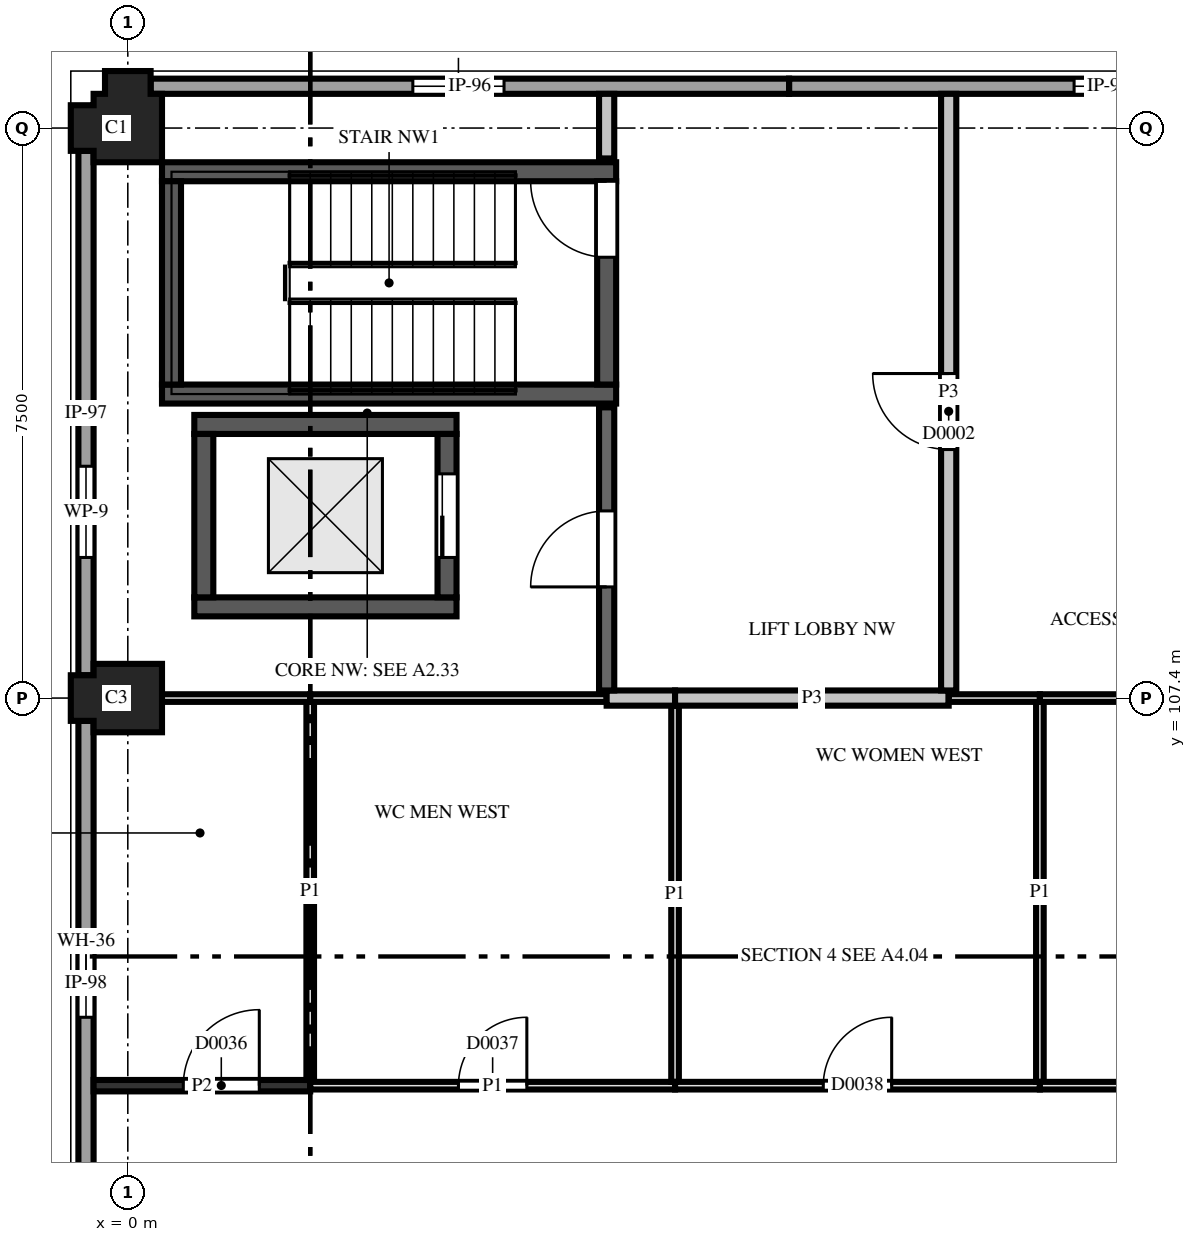
"""IFC4 building model, lengths in metres.
Left out: names, types, materials, properties, quantities, classifications, styles, units other than length and angle.
Written with IfcOpenShell. Run it as: python <this file> out.ifc"""

import sys

from ifc_helpers import new_model, si_unit, direction, frame, frame_2d, origin, place, context, subcontext, project, spatial, polyline, rectangle, outline, extrude, element, fill, save


model = new_model("IFC4")
c1 = context("Model", 3, precision=1e-05, world=origin(), true_north=direction((0.0, 1.0)))
c2 = subcontext(c1, "Body", "Model", "MODEL_VIEW")
j1 = project(units=[si_unit("LENGTHUNIT", "METRE"), si_unit("PLANEANGLEUNIT", "RADIAN")], contexts=[c1])
p1 = place(None, origin())
s1 = spatial("IfcSite", under=j1, at=p1, CompositionType="ELEMENT")
p2 = place(p1, origin())
s2 = spatial("IfcBuilding", under=s1, at=p2, CompositionType="ELEMENT")
p3 = place(p2, origin())
s3 = spatial("IfcBuildingStorey", under=s2, at=p3, CompositionType="ELEMENT", Elevation=0.0)
p4 = place(p3, frame((0.0, 107.4, 0.0), z_axis=(0.0, 0.0, 1.0), x_axis=(-1.0, 0.0, 0.0)))
e1 = element("IfcColumn", 1, at=p4, inside=s3, PredefinedType="COLUMN", context=c2, shape_type="SweptSolid", body=[
    extrude(outline(polyline([(-0.45, -0.45), (0.45, -0.45), (0.45, -0.3), (0.75, -0.3), (0.75, 0.3), (0.45, 0.3), (0.45, 0.45), (-0.45, 0.45), (-0.45, -0.45)])), origin(), (0.0, 0.0, 1.0), 4.5),
])
p5 = place(p3, frame((0.0, 114.9, 0.0), z_axis=(0.0, 0.0, 1.0), x_axis=(0.0, 1.0, 0.0)))
e2 = element("IfcColumn", 2, at=p5, inside=s3, PredefinedType="COLUMN", context=c2, shape_type="SweptSolid", body=[
    extrude(outline(polyline([(-0.45, -0.45), (0.45, -0.45), (0.45, -0.3), (0.75, -0.3), (0.75, 0.3), (0.45, 0.3), (0.45, 0.45), (0.3, 0.45), (0.3, 0.75), (-0.3, 0.75), (-0.3, 0.45), (-0.45, 0.45), (-0.45, -0.45)])), origin(), (0.0, 0.0, 1.0), 4.5),
])
for number, where, z_axis, x_axis in (
    (3, (0.875, 108.6, -1.4), (0.0, 0.0, 1.0), (1.0, 0.0, 0.0)),
    (4, (0.875, 111.0, -1.4), (0.0, 0.0, 1.0), (1.0, 0.0, 0.0)),
):
    element("IfcWall", number, at=place(p3, frame(where, z_axis=z_axis, x_axis=x_axis)), inside=s3, PredefinedType="SHEAR", context=c2, shape_type="SweptSolid", body=[
        extrude(rectangle(XDim=3.45, YDim=0.25, at=frame_2d((1.725, 0.0))), origin(), (0.0, 0.0, 1.0), 5.9),
    ])
for number, where, z_axis, x_axis in (
    (5, (0.45, 111.4, 0.0), (0.0, 0.0, 1.0), (1.0, 0.0, 0.0)),
    (6, (0.45, 114.325, 0.0), (0.0, 0.0, 1.0), (1.0, 0.0, 0.0)),
):
    element("IfcWall", number, at=place(p3, frame(where, z_axis=z_axis, x_axis=x_axis)), inside=s3, PredefinedType="SHEAR", context=c2, shape_type="SweptSolid", body=[
        extrude(rectangle(XDim=5.975, YDim=0.25, at=frame_2d((2.988, 0.0))), origin(), (0.0, 0.0, 1.0), 4.5),
    ])
p6 = place(p3, frame((0.575, 111.525, 0.0), z_axis=(0.0, 0.0, 1.0), x_axis=(0.0, 1.0, 0.0)))
e7 = element("IfcWall", 7, at=p6, inside=s3, PredefinedType="SHEAR", context=c2, shape_type="SweptSolid", body=[
    extrude(rectangle(XDim=2.675, YDim=0.25, at=frame_2d((1.337, 0.0))), origin(), (0.0, 0.0, 1.0), 4.5),
])
p7 = place(p3, frame((1.0, 108.725, -1.4), z_axis=(0.0, 0.0, 1.0), x_axis=(0.0, 1.0, 0.0)))
e8 = element("IfcWall", 8, at=p7, inside=s3, PredefinedType="SHEAR", context=c2, shape_type="SweptSolid", body=[
    extrude(rectangle(XDim=2.15, YDim=0.25, at=frame_2d((1.075, 0.0))), origin(), (0.0, 0.0, 1.0), 5.9),
])
p8 = place(p3, frame((4.2, 108.725, -1.4), z_axis=(0.0, 0.0, 1.0), x_axis=(0.0, 1.0, 0.0)))
e9 = element("IfcWall", 9, at=p8, inside=s3, PredefinedType="SHEAR", context=c2, shape_type="SweptSolid", body=[
    extrude(rectangle(XDim=2.15, YDim=0.25, at=frame_2d((1.075, 0.0))), origin(), (0.0, 0.0, 1.0), 5.9),
])
p9 = place(p8, frame((0.525, 0.0, 1.4)))
e10 = element("IfcOpeningElement", 10, at=p9, cuts=e9, PredefinedType="OPENING", context=c2, shape_type="SweptSolid", body=[
    extrude(rectangle(XDim=1.1, YDim=2.1, at=frame_2d((0.55, 1.05))), frame((0.0, 0.135, 0.0), z_axis=(0.0, -1.0, 0.0), x_axis=(1.0, 0.0, 0.0)), (0.0, 0.0, 1.0), 0.27),
])
p10 = place(p3, frame((6.3, 111.525, 0.0), z_axis=(0.0, 0.0, 1.0), x_axis=(0.0, 1.0, 0.0)))
e11 = element("IfcWall", 11, at=p10, inside=s3, PredefinedType="SHEAR", context=c2, shape_type="SweptSolid", body=[
    extrude(rectangle(XDim=2.675, YDim=0.25, at=frame_2d((1.337, 0.0))), origin(), (0.0, 0.0, 1.0), 4.5),
])
p11 = place(p10, frame((1.675, 0.0, 0.0)))
e12 = element("IfcOpeningElement", 12, at=p11, cuts=e11, PredefinedType="OPENING", context=c2, shape_type="SweptSolid", body=[
    extrude(rectangle(XDim=1.0, YDim=2.1, at=frame_2d((0.5, 1.05))), frame((0.0, 0.135, 0.0), z_axis=(0.0, -1.0, 0.0), x_axis=(1.0, 0.0, 0.0)), (0.0, 0.0, 1.0), 0.27),
])
p12 = place(p3, frame((17.1, 115.45, 0.0), z_axis=(0.0, 0.0, 1.0), x_axis=(-1.0, 0.0, 0.0)))
e13 = element("IfcWall", 13, at=p12, inside=s3, PredefinedType="SOLIDWALL", context=c2, shape_type="SweptSolid", body=[
    extrude(outline(polyline([(0.0, 0.0), (8.4, 0.0), (8.4, 2.5), (7.202, 2.5), (7.2, 2.4), (6.806, 2.412), (6.413, 2.422), (6.019, 2.43), (5.625, 2.438), (5.231, 2.443), (4.837, 2.447), (4.444, 2.449), (4.05, 2.45), (3.656, 2.449), (3.262, 2.447), (2.869, 2.443), (2.475, 2.438), (2.081, 2.43), (1.688, 2.422), (1.294, 2.412), (0.9, 2.4), (0.898, 2.5), (0.0, 2.5), (0.0, 0.0)])), frame((0.0, 0.1, 0.0), z_axis=(0.0, -1.0, 0.0), x_axis=(1.0, 0.0, 0.0)), (0.0, 0.0, 1.0), 0.2),
])
p13 = place(p12, frame((3.45, 0.0, 0.6)))
e14 = element("IfcOpeningElement", 14, at=p13, cuts=e13, PredefinedType="OPENING", context=c2, shape_type="SweptSolid", body=[
    extrude(rectangle(XDim=1.2, YDim=1.2, at=frame_2d((0.6, 0.6))), frame((0.0, 0.11, 0.0), z_axis=(0.0, -1.0, 0.0), x_axis=(1.0, 0.0, 0.0)), (0.0, 0.0, 1.0), 0.22),
])
p14 = place(p3, frame((8.7, 115.45, 0.0), z_axis=(0.0, 0.0, 1.0), x_axis=(-1.0, 0.0, 0.0)))
e15 = element("IfcWall", 15, at=p14, inside=s3, PredefinedType="SOLIDWALL", context=c2, shape_type="SweptSolid", body=[
    extrude(outline(polyline([(0.0, 0.0), (8.4, 0.0), (8.4, 2.5), (7.502, 2.5), (7.5, 2.4), (7.106, 2.412), (6.712, 2.422), (6.319, 2.43), (5.925, 2.438), (5.531, 2.443), (5.137, 2.447), (4.744, 2.449), (4.35, 2.45), (3.956, 2.449), (3.562, 2.447), (3.169, 2.443), (2.775, 2.438), (2.381, 2.43), (1.988, 2.422), (1.594, 2.412), (1.2, 2.4), (1.198, 2.5), (0.0, 2.5), (0.0, 0.0)])), frame((0.0, 0.1, 0.0), z_axis=(0.0, -1.0, 0.0), x_axis=(1.0, 0.0, 0.0)), (0.0, 0.0, 1.0), 0.2),
])
p15 = place(p14, frame((3.75, 0.0, 0.6)))
e16 = element("IfcOpeningElement", 16, at=p15, cuts=e15, PredefinedType="OPENING", context=c2, shape_type="SweptSolid", body=[
    extrude(rectangle(XDim=1.2, YDim=1.2, at=frame_2d((0.6, 0.6))), frame((0.0, 0.11, 0.0), z_axis=(0.0, -1.0, 0.0), x_axis=(1.0, 0.0, 0.0)), (0.0, 0.0, 1.0), 0.22),
])
p16 = place(p3, frame((-0.55, 114.6, 0.0), z_axis=(0.0, 0.0, 1.0), x_axis=(0.0, -1.0, 0.0)))
e17 = element("IfcWall", 17, at=p16, inside=s3, PredefinedType="SOLIDWALL", context=c2, shape_type="SweptSolid", body=[
    extrude(outline(polyline([(0.0, 0.0), (6.9, 0.0), (6.9, 3.1), (6.002, 3.1), (6.0, 2.4), (5.681, 2.56), (5.363, 2.695), (5.044, 2.806), (4.725, 2.895), (4.406, 2.963), (4.087, 3.012), (3.769, 3.041), (3.45, 3.05), (3.131, 3.041), (2.812, 3.012), (2.494, 2.963), (2.175, 2.895), (1.856, 2.806), (1.538, 2.695), (1.219, 2.56), (0.9, 2.4), (0.898, 3.1), (0.0, 3.1), (0.0, 0.0)])), frame((0.0, 0.1, 0.0), z_axis=(0.0, -1.0, 0.0), x_axis=(1.0, 0.0, 0.0)), (0.0, 0.0, 1.0), 0.2),
])
p17 = place(p16, frame((4.15, 0.0, 0.6)))
e18 = element("IfcOpeningElement", 18, at=p17, cuts=e17, PredefinedType="OPENING", context=c2, shape_type="SweptSolid", body=[
    extrude(rectangle(XDim=1.2, YDim=1.2, at=frame_2d((0.6, 0.6))), frame((0.0, 0.11, 0.0), z_axis=(0.0, -1.0, 0.0), x_axis=(1.0, 0.0, 0.0)), (0.0, 0.0, 1.0), 0.22),
])
p18 = place(p3, frame((-0.55, 107.1, 0.0), z_axis=(0.0, 0.0, 1.0), x_axis=(0.0, -1.0, 0.0)))
e19 = element("IfcWall", 19, at=p18, inside=s3, PredefinedType="SOLIDWALL", context=c2, shape_type="SweptSolid", body=[
    extrude(outline(polyline([(0.0, 0.0), (6.9, 0.0), (6.9, 3.1), (6.002, 3.1), (6.0, 2.4), (5.681, 2.56), (5.363, 2.695), (5.044, 2.806), (4.725, 2.895), (4.406, 2.963), (4.087, 3.012), (3.769, 3.041), (3.45, 3.05), (3.131, 3.041), (2.812, 3.012), (2.494, 2.963), (2.175, 2.895), (1.856, 2.806), (1.538, 2.695), (1.219, 2.56), (0.9, 2.4), (0.898, 3.1), (0.0, 3.1), (0.0, 0.0)])), frame((0.0, 0.1, 0.0), z_axis=(0.0, -1.0, 0.0), x_axis=(1.0, 0.0, 0.0)), (0.0, 0.0, 1.0), 0.2),
])
p19 = place(p18, frame((3.0, 0.0, 2.4)))
e20 = element("IfcOpeningElement", 20, at=p19, cuts=e19, PredefinedType="OPENING", context=c2, shape_type="SweptSolid", body=[
    extrude(rectangle(XDim=0.9, YDim=0.531, at=frame_2d((0.45, 0.266))), frame((0.0, 0.11, 0.0), z_axis=(0.0, -1.0, 0.0), x_axis=(1.0, 0.0, 0.0)), (0.0, 0.0, 1.0), 0.22),
])
p20 = place(p3, frame((2.4, 102.3, 0.0), z_axis=(0.0, 0.0, 1.0), x_axis=(-1.0, 0.0, 0.0)))
e21 = element("IfcWall", 21, at=p20, inside=s3, PredefinedType="PARTITIONING", context=c2, shape_type="SweptSolid", body=[
    extrude(rectangle(XDim=2.85, YDim=0.15, at=frame_2d((1.425, 0.0))), origin(), (0.0, 0.0, 1.0), 3.68),
])
p21 = place(p20, frame((0.67, 0.0, 0.0)))
e22 = element("IfcOpeningElement", 22, at=p21, cuts=e21, PredefinedType="OPENING", context=c2, shape_type="SweptSolid", body=[
    extrude(rectangle(XDim=1.0, YDim=2.1, at=frame_2d((0.5, 1.05))), frame((0.0, 0.085, 0.0), z_axis=(0.0, -1.0, 0.0), x_axis=(1.0, 0.0, 0.0)), (0.0, 0.0, 1.0), 0.17),
])
p22 = place(p3, frame((2.4, 102.375, 0.0), z_axis=(0.0, 0.0, 1.0), x_axis=(0.0, 1.0, 0.0)))
e23 = element("IfcWall", 23, at=p22, inside=s3, PredefinedType="PARTITIONING", context=c2, shape_type="SweptSolid", body=[
    extrude(rectangle(XDim=4.975, YDim=0.1, at=frame_2d((2.488, 0.0))), origin(), (0.0, 0.0, 1.0), 3.68),
])
p23 = place(p3, frame((7.2, 102.3, 0.0), z_axis=(0.0, 0.0, 1.0), x_axis=(-1.0, 0.0, 0.0)))
e24 = element("IfcWall", 24, at=p23, inside=s3, PredefinedType="PARTITIONING", context=c2, shape_type="SweptSolid", body=[
    extrude(rectangle(XDim=4.8, YDim=0.1, at=frame_2d((2.4, 0.0))), origin(), (0.0, 0.0, 1.0), 3.68),
])
p24 = place(p23, frame((1.95, 0.0, 0.0)))
e25 = element("IfcOpeningElement", 25, at=p24, cuts=e24, PredefinedType="OPENING", context=c2, shape_type="SweptSolid", body=[
    extrude(rectangle(XDim=0.9, YDim=2.1, at=frame_2d((0.45, 1.05))), frame((0.0, 0.06, 0.0), z_axis=(0.0, -1.0, 0.0), x_axis=(1.0, 0.0, 0.0)), (0.0, 0.0, 1.0), 0.12),
])
p25 = place(p3, frame((7.2, 102.35, 0.0), z_axis=(0.0, 0.0, 1.0), x_axis=(0.0, 1.0, 0.0)))
e26 = element("IfcWall", 26, at=p25, inside=s3, PredefinedType="PARTITIONING", context=c2, shape_type="SweptSolid", body=[
    extrude(rectangle(XDim=4.95, YDim=0.1, at=frame_2d((2.475, 0.0))), origin(), (0.0, 0.0, 1.0), 3.68),
])
p26 = place(p3, frame((12.0, 102.3, 0.0), z_axis=(0.0, 0.0, 1.0), x_axis=(-1.0, 0.0, 0.0)))
e27 = element("IfcWall", 27, at=p26, inside=s3, PredefinedType="PARTITIONING", context=c2, shape_type="SweptSolid", body=[
    extrude(rectangle(XDim=4.8, YDim=0.1, at=frame_2d((2.4, 0.0))), origin(), (0.0, 0.0, 1.0), 3.68),
])
p27 = place(p26, frame((1.95, 0.0, 0.0)))
e28 = element("IfcOpeningElement", 28, at=p27, cuts=e27, PredefinedType="OPENING", context=c2, shape_type="SweptSolid", body=[
    extrude(rectangle(XDim=0.9, YDim=2.1, at=frame_2d((0.45, 1.05))), frame((0.0, 0.06, 0.0), z_axis=(0.0, -1.0, 0.0), x_axis=(1.0, 0.0, 0.0)), (0.0, 0.0, 1.0), 0.12),
])
p28 = place(p3, frame((12.0, 102.35, 0.0), z_axis=(0.0, 0.0, 1.0), x_axis=(0.0, 1.0, 0.0)))
e29 = element("IfcWall", 29, at=p28, inside=s3, PredefinedType="PARTITIONING", context=c2, shape_type="SweptSolid", body=[
    extrude(rectangle(XDim=5.0, YDim=0.1, at=frame_2d((2.5, 0.0))), origin(), (0.0, 0.0, 1.0), 3.68),
])
p29 = place(p3, frame((15.05, 102.3, 0.0), z_axis=(0.0, 0.0, 1.0), x_axis=(-1.0, 0.0, 0.0)))
e30 = element("IfcWall", 30, at=p29, inside=s3, PredefinedType="PARTITIONING", context=c2, shape_type="SweptSolid", body=[
    extrude(rectangle(XDim=3.05, YDim=0.1, at=frame_2d((1.525, 0.0))), origin(), (0.0, 0.0, 1.0), 3.68),
])
p30 = place(p29, frame((1.025, 0.0, 0.0)))
e31 = element("IfcOpeningElement", 31, at=p30, cuts=e30, PredefinedType="OPENING", context=c2, shape_type="SweptSolid", body=[
    extrude(rectangle(XDim=1.0, YDim=2.1, at=frame_2d((0.5, 1.05))), frame((0.0, 0.06, 0.0), z_axis=(0.0, -1.0, 0.0), x_axis=(1.0, 0.0, 0.0)), (0.0, 0.0, 1.0), 0.12),
])
p31 = place(p3, frame((2.4, 107.4, 0.0), z_axis=(0.0, 0.0, 1.0), x_axis=(-1.0, 0.0, 0.0)))
e32 = element("IfcWall", 32, at=p31, inside=s3, PredefinedType="PARTITIONING", context=c2, shape_type="SweptSolid", body=[
    extrude(rectangle(XDim=2.34, YDim=0.1, at=frame_2d((1.17, 0.0))), origin(), (0.0, 0.0, 1.0), 3.68),
])
p32 = place(p3, frame((6.3, 107.4, 0.0), z_axis=(0.0, 0.0, 1.0), x_axis=(-1.0, 0.0, 0.0)))
e33 = element("IfcWall", 33, at=p32, inside=s3, PredefinedType="PARTITIONING", context=c2, shape_type="SweptSolid", body=[
    extrude(rectangle(XDim=3.9, YDim=0.1, at=frame_2d((1.95, 0.0))), origin(), (0.0, 0.0, 1.0), 3.68),
])
p33 = place(p3, frame((6.3, 107.4, 0.0), z_axis=(0.0, 0.0, 1.0), x_axis=(1.0, 0.0, 0.0)))
e34 = element("IfcWall", 34, at=p33, inside=s3, PredefinedType="PARTITIONING", context=c2, shape_type="SweptSolid", body=[
    extrude(rectangle(XDim=0.9, YDim=0.2, at=frame_2d((0.45, 0.0))), origin(), (0.0, 0.0, 1.0), 3.68),
])
p34 = place(p3, frame((7.2, 107.4, 0.0), z_axis=(0.0, 0.0, 1.0), x_axis=(1.0, 0.0, 0.0)))
e35 = element("IfcWall", 35, at=p34, inside=s3, PredefinedType="PARTITIONING", context=c2, shape_type="SweptSolid", body=[
    extrude(rectangle(XDim=3.6, YDim=0.2, at=frame_2d((1.8, 0.0))), origin(), (0.0, 0.0, 1.0), 3.68),
])
p35 = place(p3, frame((10.8, 107.5, 0.0), z_axis=(0.0, 0.0, 1.0), x_axis=(0.0, 1.0, 0.0)))
e36 = element("IfcWall", 36, at=p35, inside=s3, PredefinedType="PARTITIONING", context=c2, shape_type="SweptSolid", body=[
    extrude(rectangle(XDim=7.85, YDim=0.2, at=frame_2d((3.925, 0.0))), origin(), (0.0, 0.0, 1.0), 3.68),
])
p36 = place(p35, frame((3.17, 0.0, 0.0)))
e37 = element("IfcOpeningElement", 37, at=p36, cuts=e36, PredefinedType="OPENING", context=c2, shape_type="SweptSolid", body=[
    extrude(rectangle(XDim=1.0, YDim=2.1, at=frame_2d((0.5, 1.05))), frame((0.0, 0.11, 0.0), z_axis=(0.0, -1.0, 0.0), x_axis=(1.0, 0.0, 0.0)), (0.0, 0.0, 1.0), 0.22),
])
p37 = place(p3, frame((12.0, 107.4, 0.0), z_axis=(0.0, 0.0, 1.0), x_axis=(-1.0, 0.0, 0.0)))
e38 = element("IfcWall", 38, at=p37, inside=s3, PredefinedType="PARTITIONING", context=c2, shape_type="SweptSolid", body=[
    extrude(rectangle(XDim=1.2, YDim=0.1, at=frame_2d((0.6, 0.0))), origin(), (0.0, 0.0, 1.0), 3.68),
])
p38 = place(p3, frame((15.05, 107.4, 0.0), z_axis=(0.0, 0.0, 1.0), x_axis=(-1.0, 0.0, 0.0)))
e39 = element("IfcWall", 39, at=p38, inside=s3, PredefinedType="PARTITIONING", context=c2, shape_type="SweptSolid", body=[
    extrude(rectangle(XDim=3.05, YDim=0.1, at=frame_2d((1.525, 0.0))), origin(), (0.0, 0.0, 1.0), 3.68),
])
p39 = place(p3, frame((6.3, 111.225, 0.0), z_axis=(0.0, 0.0, 1.0), x_axis=(0.0, -1.0, 0.0)))
e40 = element("IfcWall", 40, at=p39, inside=s3, PredefinedType="PARTITIONING", context=c2, shape_type="SweptSolid", body=[
    extrude(rectangle(XDim=3.725, YDim=0.2, at=frame_2d((1.863, 0.0))), origin(), (0.0, 0.0, 1.0), 3.68),
])
p40 = place(p39, frame((1.363, 0.0, 0.0)))
e41 = element("IfcOpeningElement", 41, at=p40, cuts=e40, PredefinedType="OPENING", context=c2, shape_type="SweptSolid", body=[
    extrude(rectangle(XDim=1.0, YDim=2.1, at=frame_2d((0.5, 1.05))), frame((0.0, 0.11, 0.0), z_axis=(0.0, -1.0, 0.0), x_axis=(1.0, 0.0, 0.0)), (0.0, 0.0, 1.0), 0.22),
])
p41 = place(p3, frame((6.3, 115.35, 0.0), z_axis=(0.0, 0.0, 1.0), x_axis=(0.0, -1.0, 0.0)))
e42 = element("IfcWall", 42, at=p41, inside=s3, PredefinedType="PARTITIONING", context=c2, shape_type="SweptSolid", body=[
    extrude(rectangle(XDim=0.85, YDim=0.2, at=frame_2d((0.425, 0.0))), origin(), (0.0, 0.0, 1.0), 3.68),
])
p42 = place(p13, origin())
e43 = element("IfcWindow", 43, at=p42, inside=s3, PartitioningType="SINGLE_PANEL", PredefinedType="WINDOW", context=c2, shape_type="SweptSolid", body=[
    extrude(rectangle(XDim=1.2, YDim=1.2, at=frame_2d((0.6, 0.6))), frame((0.0, 0.03, 0.0), z_axis=(0.0, -1.0, 0.0), x_axis=(1.0, 0.0, 0.0)), (0.0, 0.0, 1.0), 0.06),
])
fill(e14, e43)
p43 = place(p15, origin())
e44 = element("IfcWindow", 44, at=p43, inside=s3, PartitioningType="SINGLE_PANEL", PredefinedType="WINDOW", context=c2, shape_type="SweptSolid", body=[
    extrude(rectangle(XDim=1.2, YDim=1.2, at=frame_2d((0.6, 0.6))), frame((0.0, 0.03, 0.0), z_axis=(0.0, -1.0, 0.0), x_axis=(1.0, 0.0, 0.0)), (0.0, 0.0, 1.0), 0.06),
])
fill(e16, e44)
p44 = place(p17, origin())
e45 = element("IfcWindow", 45, at=p44, inside=s3, PartitioningType="SINGLE_PANEL", PredefinedType="WINDOW", context=c2, shape_type="SweptSolid", body=[
    extrude(rectangle(XDim=1.2, YDim=1.2, at=frame_2d((0.6, 0.6))), frame((0.0, 0.03, 0.0), z_axis=(0.0, -1.0, 0.0), x_axis=(1.0, 0.0, 0.0)), (0.0, 0.0, 1.0), 0.06),
])
fill(e18, e45)
p45 = place(p19, origin())
e46 = element("IfcWindow", 46, at=p45, inside=s3, PartitioningType="SINGLE_PANEL", PredefinedType="WINDOW", context=c2, shape_type="SweptSolid", body=[
    extrude(rectangle(XDim=0.9, YDim=0.531, at=frame_2d((0.45, 0.266))), frame((0.0, 0.03, 0.0), z_axis=(0.0, -1.0, 0.0), x_axis=(1.0, 0.0, 0.0)), (0.0, 0.0, 1.0), 0.06),
])
fill(e20, e46)
p46 = place(p36, origin())
e47 = element("IfcDoor", 47, at=p46, inside=s3, OperationType="SINGLE_SWING_LEFT", PredefinedType="DOOR", context=c2, shape_type="SweptSolid", body=[
    extrude(rectangle(XDim=1.0, YDim=2.1, at=frame_2d((0.5, 1.05))), frame((0.0, 0.025, 0.0), z_axis=(0.0, -1.0, 0.0), x_axis=(1.0, 0.0, 0.0)), (0.0, 0.0, 1.0), 0.05),
])
fill(e37, e47)
p47 = place(p21, origin())
e48 = element("IfcDoor", 48, at=p47, inside=s3, OperationType="SINGLE_SWING_LEFT", PredefinedType="DOOR", context=c2, shape_type="SweptSolid", body=[
    extrude(rectangle(XDim=1.0, YDim=2.1, at=frame_2d((0.5, 1.05))), frame((0.0, 0.025, 0.0), z_axis=(0.0, -1.0, 0.0), x_axis=(1.0, 0.0, 0.0)), (0.0, 0.0, 1.0), 0.05),
])
fill(e22, e48)
p48 = place(p24, origin())
e49 = element("IfcDoor", 49, at=p48, inside=s3, OperationType="SINGLE_SWING_LEFT", PredefinedType="DOOR", context=c2, shape_type="SweptSolid", body=[
    extrude(rectangle(XDim=0.9, YDim=2.1, at=frame_2d((0.45, 1.05))), frame((0.0, 0.025, 0.0), z_axis=(0.0, -1.0, 0.0), x_axis=(1.0, 0.0, 0.0)), (0.0, 0.0, 1.0), 0.05),
])
fill(e25, e49)
p49 = place(p27, origin())
e50 = element("IfcDoor", 50, at=p49, inside=s3, OperationType="SINGLE_SWING_LEFT", PredefinedType="DOOR", context=c2, shape_type="SweptSolid", body=[
    extrude(rectangle(XDim=0.9, YDim=2.1, at=frame_2d((0.45, 1.05))), frame((0.0, 0.025, 0.0), z_axis=(0.0, -1.0, 0.0), x_axis=(1.0, 0.0, 0.0)), (0.0, 0.0, 1.0), 0.05),
])
fill(e28, e50)
p50 = place(p9, origin())
e51 = element("IfcDoor", 51, at=p50, inside=s3, OperationType="SLIDING_TO_LEFT", PredefinedType="DOOR", context=c2, shape_type="SweptSolid", body=[
    extrude(rectangle(XDim=1.1, YDim=2.1, at=frame_2d((0.55, 1.05))), frame((0.0, 0.025, 0.0), z_axis=(0.0, -1.0, 0.0), x_axis=(1.0, 0.0, 0.0)), (0.0, 0.0, 1.0), 0.05),
])
fill(e10, e51)
p51 = place(p11, origin())
e52 = element("IfcDoor", 52, at=p51, inside=s3, OperationType="SINGLE_SWING_LEFT", PredefinedType="DOOR", context=c2, shape_type="SweptSolid", body=[
    extrude(rectangle(XDim=1.0, YDim=2.1, at=frame_2d((0.5, 1.05))), frame((0.0, 0.025, 0.0), z_axis=(0.0, -1.0, 0.0), x_axis=(1.0, 0.0, 0.0)), (0.0, 0.0, 1.0), 0.05),
])
fill(e12, e52)
p52 = place(p40, origin())
e53 = element("IfcDoor", 53, at=p52, inside=s3, OperationType="SINGLE_SWING_RIGHT", PredefinedType="DOOR", context=c2, shape_type="SweptSolid", body=[
    extrude(rectangle(XDim=1.0, YDim=2.1, at=frame_2d((0.5, 1.05))), frame((0.0, 0.025, 0.0), z_axis=(0.0, -1.0, 0.0), x_axis=(1.0, 0.0, 0.0)), (0.0, 0.0, 1.0), 0.05),
])
fill(e41, e53)
save(model, sys.argv[1])
